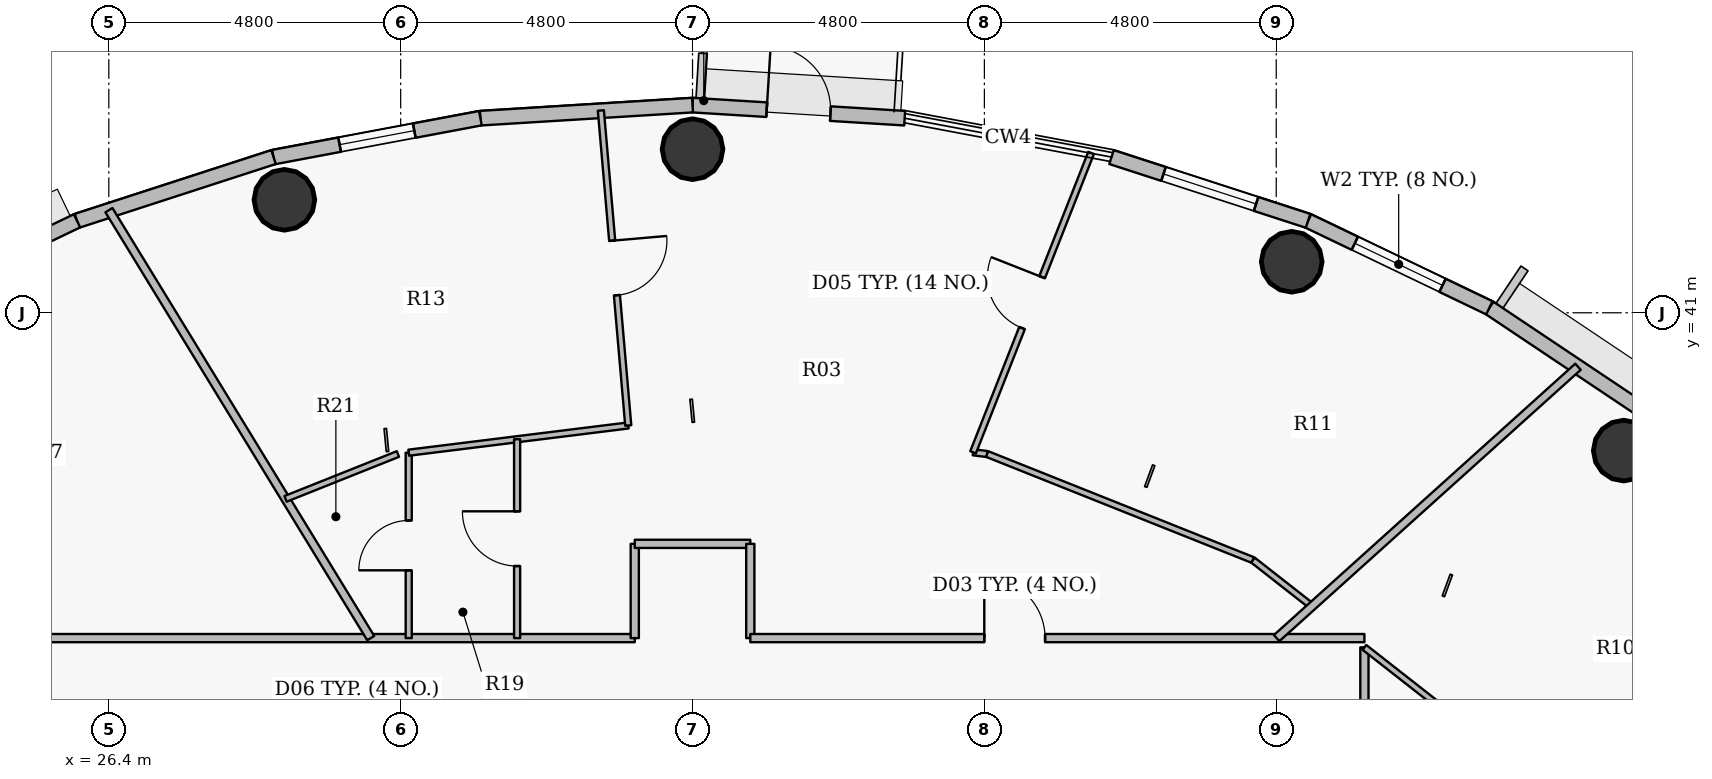
"""IFC4 building model, lengths in metres.
Left out: names, types, materials, properties, quantities, classifications, styles, units other than length and angle.
Written with IfcOpenShell. Run it as: python <this file> out.ifc"""

import sys

from ifc_helpers import new_model, si_unit, direction, frame, frame_2d, origin, origin_2d, place, context, subcontext, project, spatial, rectangle, hollow_circle, extrude, source, transform, mapped, element, fill, save


model = new_model("IFC4")
c1 = context("Model", 3, precision=1e-05, world=origin(), true_north=direction((0.0, 1.0)))
c2 = subcontext(c1, "Body", "Model", "MODEL_VIEW")
j1 = project(units=[si_unit("LENGTHUNIT", "METRE"), si_unit("PLANEANGLEUNIT", "RADIAN")], contexts=[c1])
p1 = place(None, origin())
s1 = spatial("IfcSite", under=j1, at=p1, CompositionType="ELEMENT")
p2 = place(p1, origin())
s2 = spatial("IfcBuilding", under=s1, at=p2, CompositionType="ELEMENT")
p3 = place(p2, frame((0.0, 0.0, 288.0)))
s3 = spatial("IfcBuildingStorey", under=s2, at=p3, CompositionType="ELEMENT", Elevation=288.0)
for number, where, z_axis, x_axis in (
    (1, (51.315, 38.733, 0.0), (0.0, 0.0, 1.0), (1.0, 0.0, 0.0)),
    (2, (45.854, 41.839, 0.0), (0.0, 0.0, 1.0), (1.0, 0.0, 0.0)),
    (3, (36.0, 43.69, 0.0), (0.0, 0.0, 1.0), (1.0, 0.0, 0.0)),
    (4, (29.288, 42.858, 0.0), (0.0, 0.0, 1.0), (1.0, 0.0, 0.0)),
):
    element("IfcColumn", number, at=place(p3, frame(where, z_axis=z_axis, x_axis=x_axis)), inside=s3, PredefinedType="COLUMN", context=c2, shape_type="SweptSolid", body=[
        extrude(hollow_circle(Radius=0.5, WallThickness=0.032, at=origin_2d()), origin(), (0.0, 0.0, 1.0), 3.75),
    ])
p4 = place(p3, frame((49.104, 41.082, 0.0), z_axis=(0.0, 0.0, 1.0), x_axis=(0.831250592635, -0.55589787933, 0.0)))
e5 = element("IfcWall", 5, at=p4, inside=s3, PredefinedType="SOLIDWALL", context=c2, shape_type="SweptSolid", body=[
    extrude(rectangle(XDim=3.197, YDim=0.24, at=frame_2d((1.599, 0.0))), origin(), (0.0, 0.0, 1.0), 3.5),
])
p5 = place(p3, frame((46.123, 42.512, 0.0), z_axis=(0.0, 0.0, 1.0), x_axis=(0.901573741254, -0.43262546051, 0.0)))
e6 = element("IfcWall", 6, at=p5, inside=s3, PredefinedType="SOLIDWALL", context=c2, shape_type="SweptSolid", body=[
    extrude(rectangle(XDim=3.307, YDim=0.24, at=frame_2d((1.653, 0.0))), origin(), (0.0, 0.0, 1.0), 3.5),
])
p6 = place(p5, frame((0.853, 0.0, 0.9)))
e7 = element("IfcOpeningElement", 7, at=p6, cuts=e6, PredefinedType="OPENING", context=c2, shape_type="SweptSolid", body=[
    extrude(rectangle(XDim=1.6, YDim=1.75, at=origin_2d()), frame((0.8, 0.13, 0.875), z_axis=(0.0, -1.0, 0.0), x_axis=(1.0, 0.0, 0.0)), (0.0, 0.0, 1.0), 0.26),
])
p7 = place(p3, frame((42.891, 43.56, 0.0), z_axis=(0.0, 0.0, 1.0), x_axis=(0.95123136723, -0.308478339592, 0.0)))
e8 = element("IfcWall", 8, at=p7, inside=s3, PredefinedType="SOLIDWALL", context=c2, shape_type="SweptSolid", body=[
    extrude(rectangle(XDim=3.398, YDim=0.24, at=frame_2d((1.699, 0.0))), origin(), (0.0, 0.0, 1.0), 3.5),
])
p8 = place(p7, frame((0.899, 0.0, 0.9)))
e9 = element("IfcOpeningElement", 9, at=p8, cuts=e8, PredefinedType="OPENING", context=c2, shape_type="SweptSolid", body=[
    extrude(rectangle(XDim=1.6, YDim=1.75, at=origin_2d()), frame((0.8, 0.13, 0.875), z_axis=(0.0, -1.0, 0.0), x_axis=(1.0, 0.0, 0.0)), (0.0, 0.0, 1.0), 0.26),
])
p9 = place(p3, frame((36.0, 44.415, 0.0), z_axis=(0.0, 0.0, 1.0), x_axis=(0.998104946479, -0.061534671648, 0.0)))
e10 = element("IfcWall", 10, at=p9, inside=s3, PredefinedType="SOLIDWALL", context=c2, shape_type="SweptSolid", body=[
    extrude(rectangle(XDim=3.495, YDim=0.24, at=frame_2d((1.748, 0.0))), origin(), (0.0, 0.0, 1.0), 3.5),
])
p10 = place(p9, frame((1.223, 0.0, 0.0)))
e11 = element("IfcOpeningElement", 11, at=p10, cuts=e10, PredefinedType="OPENING", context=c2, shape_type="SweptSolid", body=[
    extrude(rectangle(XDim=1.05, YDim=2.15, at=origin_2d()), frame((0.525, 0.13, 1.075), z_axis=(0.0, -1.0, 0.0), x_axis=(1.0, 0.0, 0.0)), (0.0, 0.0, 1.0), 0.26),
])
p11 = place(p3, frame((32.511, 44.2, 0.0), z_axis=(0.0, 0.0, 1.0), x_axis=(0.998104946479, 0.061534671648, 0.0)))
e12 = element("IfcWall", 12, at=p11, inside=s3, PredefinedType="SOLIDWALL", context=c2, shape_type="SweptSolid", body=[
    extrude(rectangle(XDim=3.495, YDim=0.24, at=frame_2d((1.748, 0.0))), origin(), (0.0, 0.0, 1.0), 3.5),
])
p12 = place(p3, frame((29.109, 43.56, 0.0), z_axis=(0.0, 0.0, 1.0), x_axis=(0.982782655757, 0.184765395959, 0.0)))
e13 = element("IfcWall", 13, at=p12, inside=s3, PredefinedType="SOLIDWALL", context=c2, shape_type="SweptSolid", body=[
    extrude(rectangle(XDim=3.462, YDim=0.24, at=frame_2d((1.731, 0.0))), origin(), (0.0, 0.0, 1.0), 3.5),
])
p13 = place(p12, frame((1.106, 0.0, 0.9)))
e14 = element("IfcOpeningElement", 14, at=p13, cuts=e13, PredefinedType="OPENING", context=c2, shape_type="SweptSolid", body=[
    extrude(rectangle(XDim=1.25, YDim=1.65, at=origin_2d()), frame((0.625, 0.13, 0.825), z_axis=(0.0, -1.0, 0.0), x_axis=(1.0, 0.0, 0.0)), (0.0, 0.0, 1.0), 0.26),
])
p14 = place(p3, frame((25.877, 42.512, 0.0), z_axis=(0.0, 0.0, 1.0), x_axis=(0.95123136723, 0.308478339592, 0.0)))
e15 = element("IfcWall", 15, at=p14, inside=s3, PredefinedType="SOLIDWALL", context=c2, shape_type="SweptSolid", body=[
    extrude(rectangle(XDim=3.398, YDim=0.24, at=frame_2d((1.699, 0.0))), origin(), (0.0, 0.0, 1.0), 3.5),
])
p15 = place(p3, frame((22.896, 41.082, 0.0), z_axis=(0.0, 0.0, 1.0), x_axis=(0.901573741254, 0.43262546051, 0.0)))
e16 = element("IfcWall", 16, at=p15, inside=s3, PredefinedType="SOLIDWALL", context=c2, shape_type="SweptSolid", body=[
    extrude(rectangle(XDim=3.307, YDim=0.24, at=frame_2d((1.653, 0.0))), origin(), (0.0, 0.0, 1.0), 3.5),
])
p16 = place(p15, frame((0.854, 0.0, 0.9)))
e17 = element("IfcOpeningElement", 17, at=p16, cuts=e16, PredefinedType="OPENING", context=c2, shape_type="SweptSolid", body=[
    extrude(rectangle(XDim=1.6, YDim=1.75, at=origin_2d()), frame((0.8, 0.13, 0.875), z_axis=(0.0, -1.0, 0.0), x_axis=(1.0, 0.0, 0.0)), (0.0, 0.0, 1.0), 0.26),
])
p17 = place(p3, frame((24.95, 35.65, 0.0), z_axis=(0.0, 0.0, 1.0), x_axis=(1.0, 0.0, 0.0)))
e18 = element("IfcWall", 18, at=p17, inside=s3, PredefinedType="PARTITIONING", context=c2, shape_type="SweptSolid", body=[
    extrude(rectangle(XDim=10.1, YDim=0.135, at=frame_2d((5.05, 0.0))), origin(), (0.0, 0.0, 1.0), 3.035),
])
p18 = place(p3, frame((26.402, 42.688, 0.0), z_axis=(0.0, 0.0, 1.0), x_axis=(0.521891606098, -0.853011812043, 0.0)))
e19 = element("IfcWall", 19, at=p18, inside=s3, PredefinedType="PARTITIONING", context=c2, shape_type="SweptSolid", body=[
    extrude(rectangle(XDim=8.25, YDim=0.135, at=frame_2d((4.125, 0.0))), origin(), (0.0, 0.0, 1.0), 2.985),
])
p19 = place(p3, frame((29.307, 37.94, 0.0), z_axis=(0.0, 0.0, 1.0), x_axis=(0.928797929692, 0.370586569913, 0.0)))
e20 = element("IfcWall", 20, at=p19, inside=s3, PredefinedType="PARTITIONING", context=c2, shape_type="SweptSolid", body=[
    extrude(rectangle(XDim=1.99, YDim=0.1, at=frame_2d((0.995, 0.0))), origin(), (0.0, 0.0, 1.0), 3.035),
])
p20 = place(p3, frame((31.333, 35.65, 0.0), z_axis=(0.0, 0.0, 1.0), x_axis=(0.0, 1.0, 0.0)))
e21 = element("IfcWall", 21, at=p20, inside=s3, PredefinedType="PARTITIONING", context=c2, shape_type="SweptSolid", body=[
    extrude(rectangle(XDim=3.049, YDim=0.1, at=frame_2d((1.525, 0.0))), origin(), (0.0, 0.0, 1.0), 3.035),
])
p21 = place(p20, frame((1.115, 0.0, 0.0)))
e22 = element("IfcOpeningElement", 22, at=p21, cuts=e21, PredefinedType="OPENING", context=c2, shape_type="SweptSolid", body=[
    extrude(rectangle(XDim=0.82, YDim=2.1, at=origin_2d()), frame((0.41, 0.06, 1.05), z_axis=(0.0, -1.0, 0.0), x_axis=(1.0, 0.0, 0.0)), (0.0, 0.0, 1.0), 0.12),
])
p22 = place(p3, frame((31.333, 38.699, 0.0), z_axis=(0.0, 0.0, 1.0), x_axis=(0.992398193069, 0.123068380965, 0.0)))
e23 = element("IfcWall", 23, at=p22, inside=s3, PredefinedType="PARTITIONING", context=c2, shape_type="SweptSolid", body=[
    extrude(rectangle(XDim=3.638, YDim=0.1, at=frame_2d((1.819, 0.0))), origin(), (0.0, 0.0, 1.0), 2.985),
])
p23 = place(p3, frame((33.115, 35.65, 0.0), z_axis=(0.0, 0.0, 1.0), x_axis=(0.0, 1.0, 0.0)))
e24 = element("IfcWall", 24, at=p23, inside=s3, PredefinedType="PARTITIONING", context=c2, shape_type="SweptSolid", body=[
    extrude(rectangle(XDim=3.27, YDim=0.1, at=frame_2d((1.635, 0.0))), origin(), (0.0, 0.0, 1.0), 3.5),
])
p24 = place(p23, frame((1.185, 0.0, 0.0)))
e25 = element("IfcOpeningElement", 25, at=p24, cuts=e24, PredefinedType="OPENING", context=c2, shape_type="SweptSolid", body=[
    extrude(rectangle(XDim=0.9, YDim=2.1, at=origin_2d()), frame((0.45, 0.06, 1.05), z_axis=(0.0, -1.0, 0.0), x_axis=(1.0, 0.0, 0.0)), (0.0, 0.0, 1.0), 0.12),
])
p25 = place(p3, frame((34.492, 44.327, 0.0), z_axis=(0.0, 0.0, 1.0), x_axis=(0.086674190257, -0.9962367112, 0.0)))
e26 = element("IfcWall", 26, at=p25, inside=s3, PredefinedType="PARTITIONING", context=c2, shape_type="SweptSolid", body=[
    extrude(rectangle(XDim=5.2, YDim=0.1, at=frame_2d((2.6, 0.0))), origin(), (0.0, 0.0, 1.0), 2.985),
])
p26 = place(p25, frame((2.15, 0.0, 0.0)))
e27 = element("IfcOpeningElement", 27, at=p26, cuts=e26, PredefinedType="OPENING", context=c2, shape_type="SweptSolid", body=[
    extrude(rectangle(XDim=0.9, YDim=2.1, at=origin_2d()), frame((0.45, 0.06, 1.05), z_axis=(0.0, -1.0, 0.0), x_axis=(1.0, 0.0, 0.0)), (0.0, 0.0, 1.0), 0.12),
])
p27 = place(p3, frame((35.05, 35.65, 0.0), z_axis=(0.0, 0.0, 1.0), x_axis=(0.0, 1.0, 0.0)))
e28 = element("IfcWall", 28, at=p27, inside=s3, PredefinedType="PARTITIONING", context=c2, shape_type="SweptSolid", body=[
    extrude(rectangle(XDim=1.55, YDim=0.135, at=frame_2d((0.775, 0.0))), origin(), (0.0, 0.0, 1.0), 3.5),
])
p28 = place(p3, frame((35.05, 37.2, 0.0), z_axis=(0.0, 0.0, 1.0), x_axis=(1.0, 0.0, 0.0)))
e29 = element("IfcWall", 29, at=p28, inside=s3, PredefinedType="PARTITIONING", context=c2, shape_type="SweptSolid", body=[
    extrude(rectangle(XDim=1.9, YDim=0.135, at=frame_2d((0.95, 0.0))), origin(), (0.0, 0.0, 1.0), 3.035),
])
p29 = place(p3, frame((36.95, 35.65, 0.0), z_axis=(0.0, 0.0, 1.0), x_axis=(0.0, 1.0, 0.0)))
e30 = element("IfcWall", 30, at=p29, inside=s3, PredefinedType="PARTITIONING", context=c2, shape_type="SweptSolid", body=[
    extrude(rectangle(XDim=1.55, YDim=0.135, at=frame_2d((0.775, 0.0))), origin(), (0.0, 0.0, 1.0), 3.5),
])
p30 = place(p3, frame((36.95, 35.65, 0.0), z_axis=(0.0, 0.0, 1.0), x_axis=(1.0, 0.0, 0.0)))
e31 = element("IfcWall", 31, at=p30, inside=s3, PredefinedType="PARTITIONING", context=c2, shape_type="SweptSolid", body=[
    extrude(rectangle(XDim=10.1, YDim=0.135, at=frame_2d((5.05, 0.0))), origin(), (0.0, 0.0, 1.0), 3.035),
])
p31 = place(p30, frame((3.848, 0.0, 0.0)))
e32 = element("IfcOpeningElement", 32, at=p31, cuts=e31, PredefinedType="OPENING", context=c2, shape_type="SweptSolid", body=[
    extrude(rectangle(XDim=1.0, YDim=2.15, at=origin_2d()), frame((0.5, 0.078, 1.075), z_axis=(0.0, -1.0, 0.0), x_axis=(1.0, 0.0, 0.0)), (0.0, 0.0, 1.0), 0.155),
])
p32 = place(p3, frame((40.614, 38.706, 0.0), z_axis=(0.0, 0.0, 1.0), x_axis=(0.992326164187, -0.123647821937, 0.0)))
e33 = element("IfcWall", 33, at=p32, inside=s3, PredefinedType="PARTITIONING", context=c2, shape_type="SweptSolid", body=[
    extrude(rectangle(XDim=0.233, YDim=0.1, at=frame_2d((0.116, 0.0))), origin(), (0.0, 0.0, 1.0), 3.5),
])
p33 = place(p3, frame((40.614, 38.706, 0.0), z_axis=(0.0, 0.0, 1.0), x_axis=(0.36670847824, 0.930335902772, 0.0)))
e34 = element("IfcWall", 34, at=p33, inside=s3, PredefinedType="PARTITIONING", context=c2, shape_type="SweptSolid", body=[
    extrude(rectangle(XDim=5.292, YDim=0.1, at=frame_2d((2.646, 0.0))), origin(), (0.0, 0.0, 1.0), 2.985),
])
p34 = place(p33, frame((2.196, 0.0, 0.0)))
e35 = element("IfcOpeningElement", 35, at=p34, cuts=e34, PredefinedType="OPENING", context=c2, shape_type="SweptSolid", body=[
    extrude(rectangle(XDim=0.9, YDim=2.1, at=origin_2d()), frame((0.45, 0.06, 1.05), z_axis=(0.0, -1.0, 0.0), x_axis=(1.0, 0.0, 0.0)), (0.0, 0.0, 1.0), 0.12),
])
p35 = place(p3, frame((40.845, 38.677, 0.0), z_axis=(0.0, 0.0, 1.0), x_axis=(0.928809047774, -0.370558703544, 0.0)))
e36 = element("IfcWall", 36, at=p35, inside=s3, PredefinedType="PARTITIONING", context=c2, shape_type="SweptSolid", body=[
    extrude(rectangle(XDim=4.706, YDim=0.1, at=frame_2d((2.353, 0.0))), origin(), (0.0, 0.0, 1.0), 3.035),
])
p36 = place(p3, frame((45.217, 36.933, 0.0), z_axis=(0.0, 0.0, 1.0), x_axis=(0.787354580016, -0.616500417946, 0.0)))
e37 = element("IfcWall", 37, at=p36, inside=s3, PredefinedType="PARTITIONING", context=c2, shape_type="SweptSolid", body=[
    extrude(rectangle(XDim=1.233, YDim=0.1, at=frame_2d((0.617, 0.0))), origin(), (0.0, 0.0, 1.0), 3.5),
])
p37 = place(p3, frame((45.607, 35.65, 0.0), z_axis=(0.0, 0.0, 1.0), x_axis=(0.743148504456, 0.669126520416, 0.0)))
e38 = element("IfcWall", 38, at=p37, inside=s3, PredefinedType="PARTITIONING", context=c2, shape_type="SweptSolid", body=[
    extrude(rectangle(XDim=6.669, YDim=0.135, at=frame_2d((3.334, 0.0))), origin(), (0.0, 0.0, 1.0), 2.985),
])
p38 = place(p3, frame((47.05, 18.503, 0.0), z_axis=(0.0, 0.0, 1.0), x_axis=(0.0, 1.0, 0.0)))
e39 = element("IfcWall", 39, at=p38, inside=s3, PredefinedType="PARTITIONING", context=c2, shape_type="SweptSolid", body=[
    extrude(rectangle(XDim=16.995, YDim=0.135, at=frame_2d((8.497, 0.0))), origin(), (0.0, 0.0, 1.0), 3.035),
])
p39 = place(p38, frame((7.997, 0.0, 0.0)))
e40 = element("IfcOpeningElement", 40, at=p39, cuts=e39, PredefinedType="OPENING", context=c2, shape_type="SweptSolid", body=[
    extrude(rectangle(XDim=1.0, YDim=2.15, at=origin_2d()), frame((0.5, 0.078, 1.075), z_axis=(0.0, -1.0, 0.0), x_axis=(1.0, 0.0, 0.0)), (0.0, 0.0, 1.0), 0.155),
])
p40 = place(p3, frame((47.05, 35.497, 0.0), z_axis=(0.0, 0.0, 1.0), x_axis=(0.787328855274, -0.616533270516, 0.0)))
e41 = element("IfcWall", 41, at=p40, inside=s3, PredefinedType="PARTITIONING", context=c2, shape_type="SweptSolid", body=[
    extrude(rectangle(XDim=2.077, YDim=0.1, at=frame_2d((1.039, 0.0))), origin(), (0.0, 0.0, 1.0), 3.035),
])
m1 = source(origin(), c2, "Body", "SweptSolid", [
    extrude(rectangle(XDim=1.6, YDim=1.75, at=origin_2d()), frame((0.8, 0.03, 0.875), z_axis=(0.0, -1.0, 0.0), x_axis=(1.0, 0.0, 0.0)), (0.0, 0.0, 1.0), 0.06),
])
p41 = place(p6, origin())
e42 = element("IfcWindow", 42, at=p41, inside=s3, PartitioningType="DOUBLE_PANEL_VERTICAL", PredefinedType="WINDOW", context=c2, shape_type="MappedRepresentation", body=[
    mapped(m1, transform((0.0, 0.0, 0.0), x_axis=(1.0, 0.0, 0.0), y_axis=(0.0, 1.0, 0.0), z_axis=(0.0, 0.0, 1.0), scale=1.0)),
])
fill(e7, e42)
p42 = place(p8, origin())
e43 = element("IfcWindow", 43, at=p42, inside=s3, PartitioningType="DOUBLE_PANEL_VERTICAL", PredefinedType="WINDOW", context=c2, shape_type="MappedRepresentation", body=[
    mapped(m1, transform((0.0, 0.0, 0.0), x_axis=(1.0, 0.0, 0.0), y_axis=(0.0, 1.0, 0.0), z_axis=(0.0, 0.0, 1.0), scale=1.0)),
])
fill(e9, e43)
m2 = source(origin(), c2, "Body", "SweptSolid", [
    extrude(rectangle(XDim=1.05, YDim=2.15, at=origin_2d()), frame((0.525, 0.025, 1.075), z_axis=(0.0, -1.0, 0.0), x_axis=(1.0, 0.0, 0.0)), (0.0, 0.0, 1.0), 0.05),
])
p43 = place(p10, origin())
e44 = element("IfcDoor", 44, at=p43, inside=s3, OperationType="SINGLE_SWING_LEFT", PredefinedType="DOOR", context=c2, shape_type="MappedRepresentation", body=[
    mapped(m2, transform((0.0, 0.0, 0.0), x_axis=(1.0, 0.0, 0.0), y_axis=(0.0, 1.0, 0.0), z_axis=(0.0, 0.0, 1.0), scale=1.0)),
])
fill(e11, e44)
m3 = source(origin(), c2, "Body", "SweptSolid", [
    extrude(rectangle(XDim=1.25, YDim=1.65, at=origin_2d()), frame((0.625, 0.03, 0.825), z_axis=(0.0, -1.0, 0.0), x_axis=(1.0, 0.0, 0.0)), (0.0, 0.0, 1.0), 0.06),
])
p44 = place(p13, origin())
e45 = element("IfcWindow", 45, at=p44, inside=s3, PartitioningType="SINGLE_PANEL", PredefinedType="WINDOW", context=c2, shape_type="MappedRepresentation", body=[
    mapped(m3, transform((0.0, 0.0, 0.0), x_axis=(1.0, 0.0, 0.0), y_axis=(0.0, 1.0, 0.0), z_axis=(0.0, 0.0, 1.0), scale=1.0)),
])
fill(e14, e45)
m4 = source(origin(), c2, "Body", "SweptSolid", [
    extrude(rectangle(XDim=1.0, YDim=2.15, at=origin_2d()), frame((0.5, 0.025, 1.075), z_axis=(0.0, -1.0, 0.0), x_axis=(1.0, 0.0, 0.0)), (0.0, 0.0, 1.0), 0.05),
])
p45 = place(p31, origin())
e46 = element("IfcDoor", 46, at=p45, inside=s3, OperationType="SINGLE_SWING_LEFT", PredefinedType="DOOR", context=c2, shape_type="MappedRepresentation", body=[
    mapped(m4, transform((0.0, 0.0, 0.0), x_axis=(1.0, 0.0, 0.0), y_axis=(0.0, 1.0, 0.0), z_axis=(0.0, 0.0, 1.0), scale=1.0)),
])
fill(e32, e46)
m5 = source(origin(), c2, "Body", "SweptSolid", [
    extrude(rectangle(XDim=0.9, YDim=2.1, at=origin_2d()), frame((0.45, 0.025, 1.05), z_axis=(0.0, -1.0, 0.0), x_axis=(1.0, 0.0, 0.0)), (0.0, 0.0, 1.0), 0.05),
])
p46 = place(p34, origin())
e47 = element("IfcDoor", 47, at=p46, inside=s3, OperationType="SINGLE_SWING_RIGHT", PredefinedType="DOOR", context=c2, shape_type="MappedRepresentation", body=[
    mapped(m5, transform((0.0, 0.0, 0.0), x_axis=(1.0, 0.0, 0.0), y_axis=(0.0, 1.0, 0.0), z_axis=(0.0, 0.0, 1.0), scale=1.0)),
])
fill(e35, e47)
p47 = place(p26, origin())
e48 = element("IfcDoor", 48, at=p47, inside=s3, OperationType="SINGLE_SWING_LEFT", PredefinedType="DOOR", context=c2, shape_type="MappedRepresentation", body=[
    mapped(m5, transform((0.0, 0.0, 0.0), x_axis=(1.0, 0.0, 0.0), y_axis=(0.0, 1.0, 0.0), z_axis=(0.0, 0.0, 1.0), scale=1.0)),
])
fill(e27, e48)
p48 = place(p24, origin())
e49 = element("IfcDoor", 49, at=p48, inside=s3, OperationType="SINGLE_SWING_RIGHT", PredefinedType="DOOR", context=c2, shape_type="MappedRepresentation", body=[
    mapped(m5, transform((0.0, 0.0, 0.0), x_axis=(1.0, 0.0, 0.0), y_axis=(0.0, 1.0, 0.0), z_axis=(0.0, 0.0, 1.0), scale=1.0)),
])
fill(e25, e49)
m6 = source(origin(), c2, "Body", "SweptSolid", [
    extrude(rectangle(XDim=0.82, YDim=2.1, at=origin_2d()), frame((0.41, 0.025, 1.05), z_axis=(0.0, -1.0, 0.0), x_axis=(1.0, 0.0, 0.0)), (0.0, 0.0, 1.0), 0.05),
])
p49 = place(p21, origin())
e50 = element("IfcDoor", 50, at=p49, inside=s3, OperationType="SINGLE_SWING_LEFT", PredefinedType="DOOR", context=c2, shape_type="MappedRepresentation", body=[
    mapped(m6, transform((0.0, 0.0, 0.0), x_axis=(1.0, 0.0, 0.0), y_axis=(0.0, 1.0, 0.0), z_axis=(0.0, 0.0, 1.0), scale=1.0)),
])
fill(e22, e50)
save(model, sys.argv[1])
